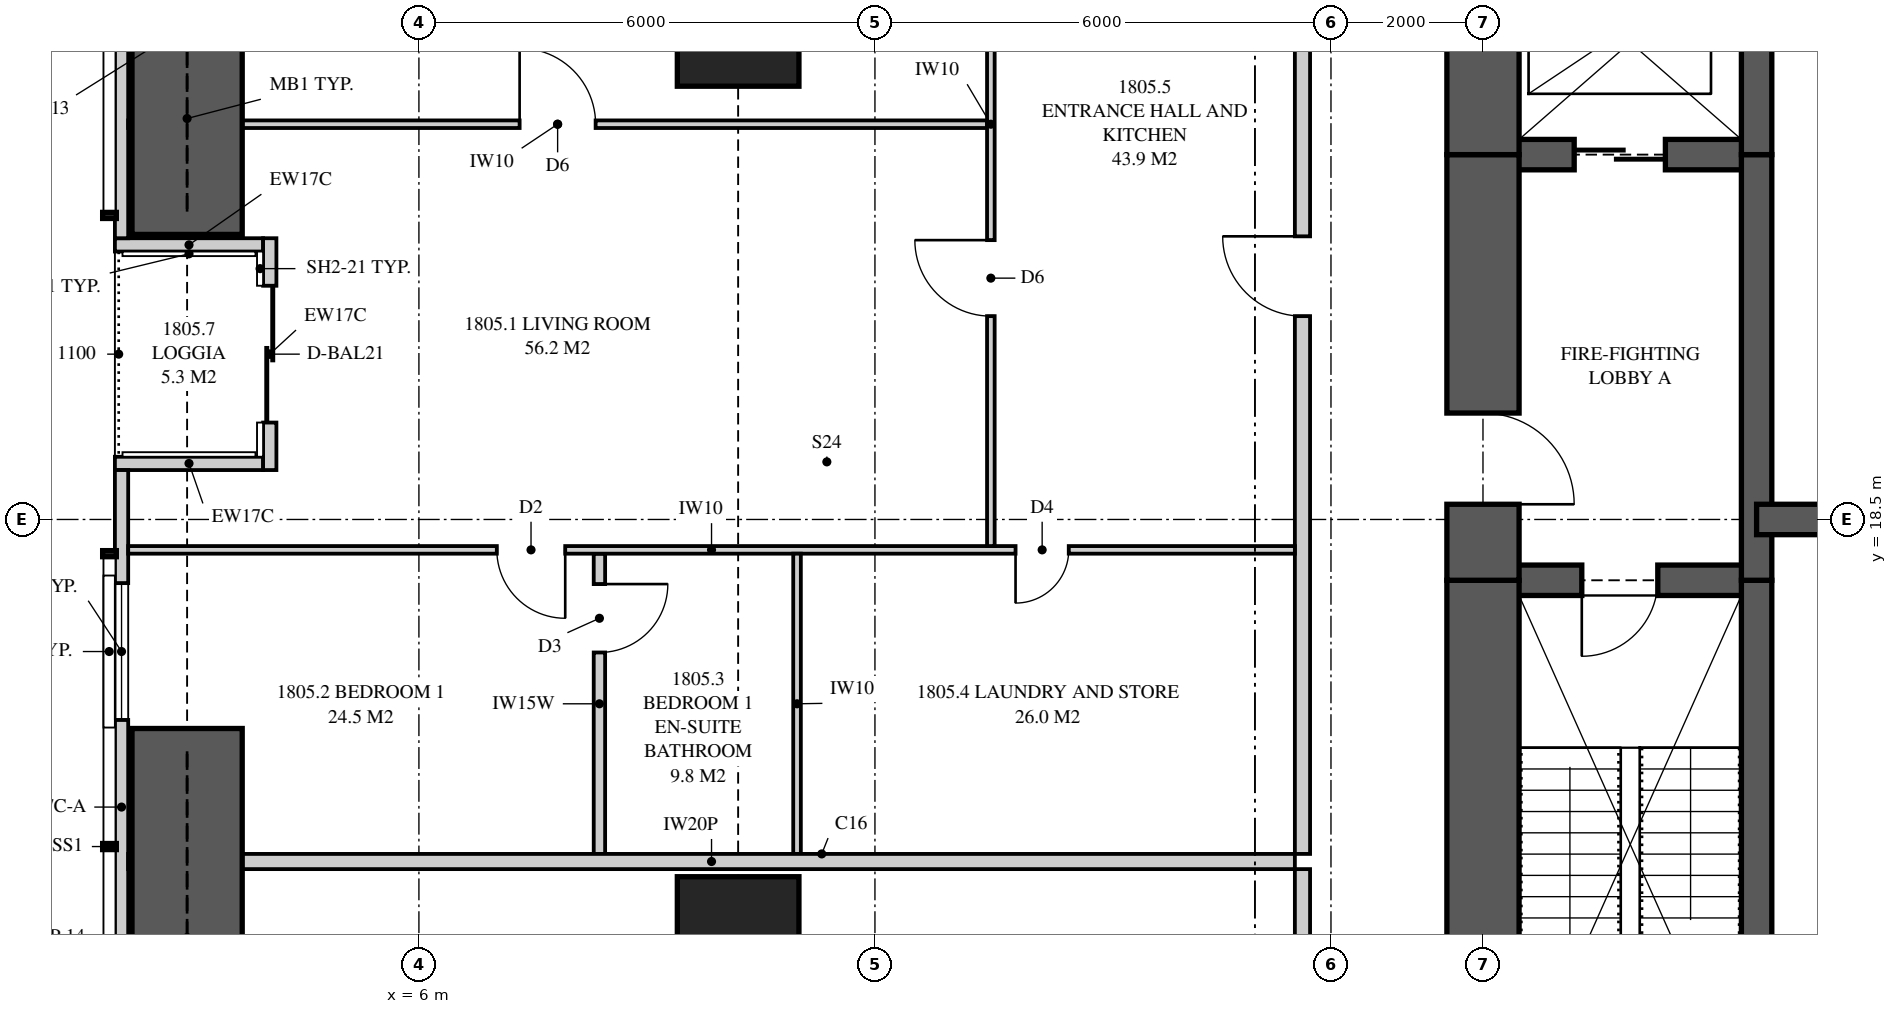
"""IFC4 building model, lengths in metres.
Left out: names, types, materials, properties, quantities, classifications, styles, units other than length and angle.
Written with IfcOpenShell. Run it as: python <this file> out.ifc"""

import sys

from ifc_helpers import new_model, si_unit, direction, frame, frame_2d, origin, origin_2d, place, context, subcontext, project, spatial, polyline, rectangle, outline, extrude, element, fill, save


model = new_model("IFC4")
c1 = context("Model", 3, precision=1e-05, world=origin(), true_north=direction((0.0, 1.0)))
c2 = subcontext(c1, "Body", "Model", "MODEL_VIEW")
j1 = project(units=[si_unit("LENGTHUNIT", "METRE"), si_unit("PLANEANGLEUNIT", "RADIAN")], contexts=[c1])
p1 = place(None, origin())
s1 = spatial("IfcSite", under=j1, at=p1, CompositionType="ELEMENT")
p2 = place(p1, origin())
s2 = spatial("IfcBuilding", under=s1, at=p2, CompositionType="ELEMENT")
p3 = place(p2, frame((0.0, 0.0, 67.9)))
s3 = spatial("IfcBuildingStorey", under=s2, at=p3, CompositionType="ELEMENT", Elevation=67.9)
for number, where, z_axis, x_axis in (
    (1, (10.2, 13.0, 0.0), (0.0, 0.0, 1.0), (1.0, 0.0, 0.0)),
    (2, (10.2, 25.0, 0.0), (0.0, 0.0, 1.0), (1.0, 0.0, 0.0)),
):
    element("IfcColumn", number, at=place(p3, frame(where, z_axis=z_axis, x_axis=x_axis)), inside=s3, PredefinedType="COLUMN", context=c2, shape_type="SweptSolid", body=[
        extrude(rectangle(XDim=1.6, YDim=1.6, at=origin_2d()), origin(), (0.0, 0.0, 1.0), 3.35),
    ])
p4 = place(p3, frame((20.0, 26.05, 0.0), z_axis=(0.0, 0.0, 1.0), x_axis=(0.0, -1.0, 0.0)))
e3 = element("IfcWall", 3, at=p4, inside=s3, PredefinedType="SHEAR", context=c2, shape_type="SweptSolid", body=[
    extrude(rectangle(XDim=2.75, YDim=0.95, at=frame_2d((1.375, 0.0))), origin(), (0.0, 0.0, 1.0), 3.35),
])
p5 = place(p3, frame((20.0, 23.3, 0.0), z_axis=(0.0, 0.0, 1.0), x_axis=(0.0, -1.0, 0.0)))
e4 = element("IfcWall", 4, at=p5, inside=s3, PredefinedType="SHEAR", context=c2, shape_type="SweptSolid", body=[
    extrude(rectangle(XDim=5.6, YDim=0.95, at=frame_2d((2.8, 0.0))), origin(), (0.0, 0.0, 1.0), 3.35),
])
p6 = place(p5, frame((3.4, 0.0, 0.0)))
e5 = element("IfcOpeningElement", 5, at=p6, cuts=e4, PredefinedType="OPENING", context=c2, shape_type="SweptSolid", body=[
    extrude(rectangle(XDim=1.2, YDim=2.2, at=frame_2d((0.6, 1.1))), frame((0.0, 0.485, 0.0), z_axis=(0.0, -1.0, 0.0), x_axis=(1.0, 0.0, 0.0)), (0.0, 0.0, 1.0), 0.97),
])
p7 = place(p3, frame((20.0, 17.7, 0.0), z_axis=(0.0, 0.0, 1.0), x_axis=(0.0, -1.0, 0.0)))
e6 = element("IfcWall", 6, at=p7, inside=s3, PredefinedType="SHEAR", context=c2, shape_type="SweptSolid", body=[
    extrude(rectangle(XDim=4.7, YDim=0.95, at=frame_2d((2.35, 0.0))), origin(), (0.0, 0.0, 1.0), 3.35),
])
p8 = place(p3, frame((23.6, 10.95, 0.0), z_axis=(0.0, 0.0, 1.0), x_axis=(0.0, 1.0, 0.0)))
e7 = element("IfcWall", 7, at=p8, inside=s3, PredefinedType="SHEAR", context=c2, shape_type="SweptSolid", body=[
    extrude(rectangle(XDim=6.75, YDim=0.4, at=frame_2d((3.375, 0.0))), origin(), (0.0, 0.0, 1.0), 3.35),
])
p9 = place(p3, frame((23.6, 17.7, 0.0), z_axis=(0.0, 0.0, 1.0), x_axis=(0.0, 1.0, 0.0)))
e8 = element("IfcWall", 8, at=p9, inside=s3, PredefinedType="SHEAR", context=c2, shape_type="SweptSolid", body=[
    extrude(rectangle(XDim=5.6, YDim=0.4, at=frame_2d((2.8, 0.0))), origin(), (0.0, 0.0, 1.0), 3.35),
])
p10 = place(p3, frame((23.6, 23.3, 0.0), z_axis=(0.0, 0.0, 1.0), x_axis=(0.0, 1.0, 0.0)))
e9 = element("IfcWall", 9, at=p10, inside=s3, PredefinedType="SHEAR", context=c2, shape_type="SweptSolid", body=[
    extrude(rectangle(XDim=2.75, YDim=0.4, at=frame_2d((1.375, 0.0))), origin(), (0.0, 0.0, 1.0), 3.35),
])
p11 = place(p3, frame((20.0, 17.7, 0.0), z_axis=(0.0, 0.0, 1.0), x_axis=(1.0, 0.0, 0.0)))
e10 = element("IfcWall", 10, at=p11, inside=s3, PredefinedType="SHEAR", context=c2, shape_type="SweptSolid", body=[
    extrude(rectangle(XDim=3.6, YDim=0.4, at=frame_2d((1.8, 0.0))), origin(), (0.0, 0.0, 1.0), 3.35),
])
p12 = place(p11, frame((1.3, 0.0, 0.0)))
e11 = element("IfcOpeningElement", 11, at=p12, cuts=e10, PredefinedType="OPENING", context=c2, shape_type="SweptSolid", body=[
    extrude(rectangle(XDim=1.0, YDim=2.1, at=frame_2d((0.5, 1.05))), frame((0.0, 0.21, 0.0), z_axis=(0.0, -1.0, 0.0), x_axis=(1.0, 0.0, 0.0)), (0.0, 0.0, 1.0), 0.42),
])
p13 = place(p3, frame((20.0, 23.3, 0.0), z_axis=(0.0, 0.0, 1.0), x_axis=(1.0, 0.0, 0.0)))
e12 = element("IfcWall", 12, at=p13, inside=s3, PredefinedType="SHEAR", context=c2, shape_type="SweptSolid", body=[
    extrude(rectangle(XDim=3.6, YDim=0.4, at=frame_2d((1.8, 0.0))), origin(), (0.0, 0.0, 1.0), 3.35),
])
p14 = place(p13, frame((1.2, 0.0, 0.0)))
e13 = element("IfcOpeningElement", 13, at=p14, cuts=e12, PredefinedType="OPENING", context=c2, shape_type="SweptSolid", body=[
    extrude(rectangle(XDim=1.2, YDim=2.1, at=frame_2d((0.6, 1.05))), frame((0.0, 0.21, 0.0), z_axis=(0.0, -1.0, 0.0), x_axis=(1.0, 0.0, 0.0)), (0.0, 0.0, 1.0), 0.42),
])
p15 = place(p3, frame((23.6, 18.5, 0.0), z_axis=(0.0, 0.0, 1.0), x_axis=(1.0, 0.0, 0.0)))
e14 = element("IfcWall", 14, at=p15, inside=s3, PredefinedType="SHEAR", context=c2, shape_type="SweptSolid", body=[
    extrude(rectangle(XDim=2.4, YDim=0.4, at=frame_2d((1.2, 0.0))), origin(), (0.0, 0.0, 1.0), 3.35),
])
p16 = place(p3, frame((2.087, 27.718, 0.0), z_axis=(0.0, 0.0, 1.0), x_axis=(0.0, -1.0, 0.0)))
e15 = element("IfcWall", 15, at=p16, inside=s3, PredefinedType="SOLIDWALL", context=c2, shape_type="SweptSolid", body=[
    extrude(rectangle(XDim=5.518, YDim=0.175, at=frame_2d((2.759, 0.0))), origin(), (0.0, 0.0, 1.0), 2.15),
])
p17 = place(p3, frame((2.087, 19.15, 0.0), z_axis=(0.0, 0.0, 1.0), x_axis=(0.0, -1.0, 0.0)))
e16 = element("IfcWall", 16, at=p17, inside=s3, PredefinedType="SOLIDWALL", context=c2, shape_type="SweptSolid", body=[
    extrude(rectangle(XDim=8.867, YDim=0.175, at=frame_2d((4.434, 0.0))), origin(), (0.0, 0.0, 1.0), 2.15),
])
p18 = place(p17, frame((1.488, 0.0, 0.4)))
e17 = element("IfcOpeningElement", 17, at=p18, cuts=e16, PredefinedType="OPENING", context=c2, shape_type="SweptSolid", body=[
    extrude(rectangle(XDim=1.8, YDim=1.7, at=frame_2d((0.9, 0.85))), frame((0.0, 0.097, 0.0), z_axis=(0.0, -1.0, 0.0), x_axis=(1.0, 0.0, 0.0)), (0.0, 0.0, 1.0), 0.195),
])
p19 = place(p3, frame((4.038, 22.2, 0.0), z_axis=(0.0, 0.0, 1.0), x_axis=(0.0, -1.0, 0.0)))
e18 = element("IfcWall", 18, at=p19, inside=s3, PredefinedType="SOLIDWALL", context=c2, shape_type="SweptSolid", body=[
    extrude(rectangle(XDim=3.05, YDim=0.175, at=frame_2d((1.525, 0.0))), origin(), (0.0, 0.0, 1.0), 2.15),
])
p20 = place(p19, frame((0.625, 0.0, 0.0)))
e19 = element("IfcOpeningElement", 19, at=p20, cuts=e18, PredefinedType="OPENING", context=c2, shape_type="SweptSolid", body=[
    extrude(rectangle(XDim=1.8, YDim=2.1, at=frame_2d((0.9, 1.05))), frame((0.0, 0.097, 0.0), z_axis=(0.0, -1.0, 0.0), x_axis=(1.0, 0.0, 0.0)), (0.0, 0.0, 1.0), 0.195),
])
for number, where, z_axis, x_axis in (
    (20, (2.0, 22.113, 0.0), (0.0, 0.0, 1.0), (1.0, 0.0, 0.0)),
    (21, (2.0, 19.238, 0.0), (0.0, 0.0, 1.0), (1.0, 0.0, 0.0)),
):
    element("IfcWall", number, at=place(p3, frame(where, z_axis=z_axis, x_axis=x_axis)), inside=s3, PredefinedType="SOLIDWALL", context=c2, shape_type="SweptSolid", body=[
        extrude(rectangle(XDim=1.95, YDim=0.175, at=frame_2d((0.975, 0.0))), origin(), (0.0, 0.0, 1.0), 2.15),
    ])
p21 = place(p3, frame((2.175, 14.0, 0.0), z_axis=(0.0, 0.0, 1.0), x_axis=(1.0, 0.0, 0.0)))
e22 = element("IfcWall", 22, at=p21, inside=s3, PredefinedType="PARTITIONING", context=c2, shape_type="SweptSolid", body=[
    extrude(outline(polyline([(0.529, 2.15), (0.0, 2.15), (0.0, 0.0), (0.529, 0.0), (0.529, 0.821), (1.021, 0.821), (1.021, 0.0), (15.35, 0.0), (15.35, 3.11), (9.335, 3.11), (9.335, 2.51), (6.715, 2.51), (6.715, 3.11), (2.085, 3.11), (2.085, 2.15), (1.021, 2.15), (1.021, 1.33), (0.529, 1.33), (0.529, 2.15)])), frame((0.0, 0.1, 0.0), z_axis=(0.0, -1.0, 0.0), x_axis=(1.0, 0.0, 0.0)), (0.0, 0.0, 1.0), 0.2),
])
p22 = place(p3, frame((17.625, 7.75, 0.0), z_axis=(0.0, 0.0, 1.0), x_axis=(0.0, 1.0, 0.0)))
e23 = element("IfcWall", 23, at=p22, inside=s3, PredefinedType="PARTITIONING", context=c2, shape_type="SweptSolid", body=[
    extrude(outline(polyline([(0.0, 0.0), (6.15, 0.0), (6.15, 3.11), (5.587, 3.11), (5.587, 2.541), (4.913, 2.541), (4.913, 3.11), (0.0, 3.11), (0.0, 0.0)])), frame((0.0, 0.1, 0.0), z_axis=(0.0, -1.0, 0.0), x_axis=(1.0, 0.0, 0.0)), (0.0, 0.0, 1.0), 0.2),
])
p23 = place(p22, frame((2.175, 0.0, 0.0)))
e24 = element("IfcOpeningElement", 24, at=p23, cuts=e23, PredefinedType="OPENING", context=c2, shape_type="SweptSolid", body=[
    extrude(rectangle(XDim=1.8, YDim=2.1, at=frame_2d((0.9, 1.05))), frame((0.0, 0.11, 0.0), z_axis=(0.0, -1.0, 0.0), x_axis=(1.0, 0.0, 0.0)), (0.0, 0.0, 1.0), 0.22),
])
p24 = place(p3, frame((17.625, 14.1, 0.0), z_axis=(0.0, 0.0, 1.0), x_axis=(0.0, 1.0, 0.0)))
e25 = element("IfcWall", 25, at=p24, inside=s3, PredefinedType="PARTITIONING", context=c2, shape_type="SweptSolid", body=[
    extrude(outline(polyline([(0.0, 0.0), (15.15, 0.0), (15.15, 3.11), (11.237, 3.11), (11.237, 2.541), (10.562, 2.541), (10.562, 3.11), (0.0, 3.11), (0.0, 0.0)])), frame((0.0, 0.1, 0.0), z_axis=(0.0, -1.0, 0.0), x_axis=(1.0, 0.0, 0.0)), (0.0, 0.0, 1.0), 0.2),
])
p25 = place(p24, frame((7.075, 0.0, 0.0)))
e26 = element("IfcOpeningElement", 26, at=p25, cuts=e25, PredefinedType="OPENING", context=c2, shape_type="SweptSolid", body=[
    extrude(rectangle(XDim=1.05, YDim=2.2, at=frame_2d((0.525, 1.1))), frame((0.0, 0.11, 0.0), z_axis=(0.0, -1.0, 0.0), x_axis=(1.0, 0.0, 0.0)), (0.0, 0.0, 1.0), 0.22),
])
p26 = place(p3, frame((2.175, 18.1, 0.0), z_axis=(0.0, 0.0, 1.0), x_axis=(1.0, 0.0, 0.0)))
e27 = element("IfcWall", 27, at=p26, inside=s3, PredefinedType="PARTITIONING", context=c2, shape_type="SweptSolid", body=[
    extrude(outline(polyline([(0.0, 0.0), (15.35, 0.0), (15.35, 3.11), (9.285, 3.11), (9.285, 2.51), (6.765, 2.51), (6.765, 3.11), (2.035, 3.11), (2.035, 2.15), (0.0, 2.15), (0.0, 3.11), (0.0, 0.0)])), frame((0.0, 0.05, 0.0), z_axis=(0.0, -1.0, 0.0), x_axis=(1.0, 0.0, 0.0)), (0.0, 0.0, 1.0), 0.1),
])
p27 = place(p26, frame((4.85, 0.0, 0.0)))
e28 = element("IfcOpeningElement", 28, at=p27, cuts=e27, PredefinedType="OPENING", context=c2, shape_type="SweptSolid", body=[
    extrude(rectangle(XDim=0.9, YDim=2.1, at=frame_2d((0.45, 1.05))), frame((0.0, 0.06, 0.0), z_axis=(0.0, -1.0, 0.0), x_axis=(1.0, 0.0, 0.0)), (0.0, 0.0, 1.0), 0.12),
])
p28 = place(p26, frame((11.675, 0.0, 0.0)))
e29 = element("IfcOpeningElement", 29, at=p28, cuts=e27, PredefinedType="OPENING", context=c2, shape_type="SweptSolid", body=[
    extrude(rectangle(XDim=0.7, YDim=2.1, at=frame_2d((0.35, 1.05))), frame((0.0, 0.06, 0.0), z_axis=(0.0, -1.0, 0.0), x_axis=(1.0, 0.0, 0.0)), (0.0, 0.0, 1.0), 0.12),
])
p29 = place(p3, frame((8.375, 14.1, 0.0), z_axis=(0.0, 0.0, 1.0), x_axis=(0.0, 1.0, 0.0)))
e30 = element("IfcWall", 30, at=p29, inside=s3, PredefinedType="PLUMBINGWALL", context=c2, shape_type="SweptSolid", body=[
    extrude(rectangle(XDim=3.95, YDim=0.15, at=frame_2d((1.975, 0.0))), origin(), (0.0, 0.0, 1.0), 3.11),
])
p30 = place(p29, frame((2.65, 0.0, 0.0)))
e31 = element("IfcOpeningElement", 31, at=p30, cuts=e30, PredefinedType="OPENING", context=c2, shape_type="SweptSolid", body=[
    extrude(rectangle(XDim=0.9, YDim=2.1, at=frame_2d((0.45, 1.05))), frame((0.0, 0.085, 0.0), z_axis=(0.0, -1.0, 0.0), x_axis=(1.0, 0.0, 0.0)), (0.0, 0.0, 1.0), 0.17),
])
p31 = place(p3, frame((10.975, 14.1, 0.0), z_axis=(0.0, 0.0, 1.0), x_axis=(0.0, 1.0, 0.0)))
e32 = element("IfcWall", 32, at=p31, inside=s3, PredefinedType="PARTITIONING", context=c2, shape_type="SweptSolid", body=[
    extrude(outline(polyline([(0.0, 0.0), (3.95, 0.0), (3.95, 3.11), (3.95, 2.51), (0.0, 2.51), (0.0, 3.11), (0.0, 0.0)])), frame((0.0, 0.05, 0.0), z_axis=(0.0, -1.0, 0.0), x_axis=(1.0, 0.0, 0.0)), (0.0, 0.0, 1.0), 0.1),
])
p32 = place(p3, frame((13.525, 18.15, 0.0), z_axis=(0.0, 0.0, 1.0), x_axis=(0.0, 1.0, 0.0)))
e33 = element("IfcWall", 33, at=p32, inside=s3, PredefinedType="PARTITIONING", context=c2, shape_type="SweptSolid", body=[
    extrude(outline(polyline([(0.0, 0.0), (11.1, 0.0), (11.1, 3.11), (7.137, 3.11), (7.137, 2.541), (6.563, 2.541), (6.563, 3.11), (0.0, 3.11), (0.0, 0.0)])), frame((0.0, 0.05, 0.0), z_axis=(0.0, -1.0, 0.0), x_axis=(1.0, 0.0, 0.0)), (0.0, 0.0, 1.0), 0.1),
])
p33 = place(p32, frame((3.025, 0.0, 0.0)))
e34 = element("IfcOpeningElement", 34, at=p33, cuts=e33, PredefinedType="OPENING", context=c2, shape_type="SweptSolid", body=[
    extrude(rectangle(XDim=1.0, YDim=2.1, at=frame_2d((0.5, 1.05))), frame((0.0, 0.06, 0.0), z_axis=(0.0, -1.0, 0.0), x_axis=(1.0, 0.0, 0.0)), (0.0, 0.0, 1.0), 0.12),
])
p34 = place(p3, frame((2.175, 23.7, 0.0), z_axis=(0.0, 0.0, 1.0), x_axis=(1.0, 0.0, 0.0)))
e35 = element("IfcWall", 35, at=p34, inside=s3, PredefinedType="PARTITIONING", context=c2, shape_type="SweptSolid", body=[
    extrude(outline(polyline([(0.529, 2.15), (0.0, 2.15), (0.0, 0.0), (0.529, 0.0), (0.529, 0.581), (1.021, 0.581), (1.021, 0.0), (11.3, 0.0), (11.3, 3.11), (9.285, 3.11), (9.285, 2.51), (6.765, 2.51), (6.765, 3.11), (2.035, 3.11), (2.035, 2.15), (1.021, 2.15), (1.021, 1.569), (0.529, 1.569), (0.529, 2.15)])), frame((0.0, 0.05, 0.0), z_axis=(0.0, -1.0, 0.0), x_axis=(1.0, 0.0, 0.0)), (0.0, 0.0, 1.0), 0.1),
])
p35 = place(p34, frame((5.15, 0.0, 0.0)))
e36 = element("IfcOpeningElement", 36, at=p35, cuts=e35, PredefinedType="OPENING", context=c2, shape_type="SweptSolid", body=[
    extrude(rectangle(XDim=1.0, YDim=2.1, at=frame_2d((0.5, 1.05))), frame((0.0, 0.06, 0.0), z_axis=(0.0, -1.0, 0.0), x_axis=(1.0, 0.0, 0.0)), (0.0, 0.0, 1.0), 0.12),
])
for number, where, z_axis, x_axis in (
    (37, (2.95, 22.25, 0.0), (0.0, 0.0, 1.0), (0.0, 1.0, 0.0)),
    (38, (2.95, 10.25, 0.0), (0.0, 0.0, 1.0), (0.0, 1.0, 0.0)),
):
    element("IfcWall", number, at=place(p3, frame(where, z_axis=z_axis, x_axis=x_axis)), inside=s3, PredefinedType="SHEAR", context=c2, shape_type="SweptSolid", body=[
        extrude(rectangle(XDim=5.5, YDim=1.45, at=frame_2d((2.75, 0.0))), origin(), (0.0, 0.0, 1.0), 3.35),
    ])
p36 = place(p20, origin())
e39 = element("IfcDoor", 39, at=p36, inside=s3, OperationType="SLIDING_TO_LEFT", PredefinedType="DOOR", context=c2, shape_type="SweptSolid", body=[
    extrude(rectangle(XDim=1.8, YDim=2.1, at=frame_2d((0.9, 1.05))), frame((0.0, 0.025, 0.0), z_axis=(0.0, -1.0, 0.0), x_axis=(1.0, 0.0, 0.0)), (0.0, 0.0, 1.0), 0.05),
])
fill(e19, e39)
p37 = place(p18, origin())
e40 = element("IfcWindow", 40, at=p37, inside=s3, PartitioningType="SINGLE_PANEL", PredefinedType="WINDOW", context=c2, shape_type="SweptSolid", body=[
    extrude(rectangle(XDim=1.8, YDim=1.7, at=frame_2d((0.9, 0.85))), frame((0.0, 0.03, 0.0), z_axis=(0.0, -1.0, 0.0), x_axis=(1.0, 0.0, 0.0)), (0.0, 0.0, 1.0), 0.06),
])
fill(e17, e40)
p38 = place(p25, origin())
e41 = element("IfcDoor", 41, at=p38, inside=s3, OperationType="SINGLE_SWING_RIGHT", PredefinedType="DOOR", context=c2, shape_type="SweptSolid", body=[
    extrude(rectangle(XDim=1.05, YDim=2.2, at=frame_2d((0.525, 1.1))), frame((0.0, 0.025, 0.0), z_axis=(0.0, -1.0, 0.0), x_axis=(1.0, 0.0, 0.0)), (0.0, 0.0, 1.0), 0.05),
])
fill(e26, e41)
p39 = place(p27, frame((0.9, 0.0, 0.0), z_axis=(0.0, 0.0, 1.0), x_axis=(-1.0, 0.0, 0.0)))
e42 = element("IfcDoor", 42, at=p39, inside=s3, OperationType="SINGLE_SWING_LEFT", PredefinedType="DOOR", context=c2, shape_type="SweptSolid", body=[
    extrude(rectangle(XDim=0.9, YDim=2.1, at=frame_2d((0.45, 1.05))), frame((0.0, 0.025, 0.0), z_axis=(0.0, -1.0, 0.0), x_axis=(1.0, 0.0, 0.0)), (0.0, 0.0, 1.0), 0.05),
])
fill(e28, e42)
p40 = place(p30, frame((0.9, 0.0, 0.0), z_axis=(0.0, 0.0, 1.0), x_axis=(-1.0, 0.0, 0.0)))
e43 = element("IfcDoor", 43, at=p40, inside=s3, OperationType="SINGLE_SWING_LEFT", PredefinedType="DOOR", context=c2, shape_type="SweptSolid", body=[
    extrude(rectangle(XDim=0.9, YDim=2.1, at=frame_2d((0.45, 1.05))), frame((0.0, 0.025, 0.0), z_axis=(0.0, -1.0, 0.0), x_axis=(1.0, 0.0, 0.0)), (0.0, 0.0, 1.0), 0.05),
])
fill(e31, e43)
p41 = place(p28, frame((0.7, 0.0, 0.0), z_axis=(0.0, 0.0, 1.0), x_axis=(-1.0, 0.0, 0.0)))
e44 = element("IfcDoor", 44, at=p41, inside=s3, OperationType="SINGLE_SWING_RIGHT", PredefinedType="DOOR", context=c2, shape_type="SweptSolid", body=[
    extrude(rectangle(XDim=0.7, YDim=2.1, at=frame_2d((0.35, 1.05))), frame((0.0, 0.025, 0.0), z_axis=(0.0, -1.0, 0.0), x_axis=(1.0, 0.0, 0.0)), (0.0, 0.0, 1.0), 0.05),
])
fill(e29, e44)
p42 = place(p33, origin())
e45 = element("IfcDoor", 45, at=p42, inside=s3, OperationType="SINGLE_SWING_RIGHT", PredefinedType="DOOR", context=c2, shape_type="SweptSolid", body=[
    extrude(rectangle(XDim=1.0, YDim=2.1, at=frame_2d((0.5, 1.05))), frame((0.0, 0.025, 0.0), z_axis=(0.0, -1.0, 0.0), x_axis=(1.0, 0.0, 0.0)), (0.0, 0.0, 1.0), 0.05),
])
fill(e34, e45)
p43 = place(p35, origin())
e46 = element("IfcDoor", 46, at=p43, inside=s3, OperationType="SINGLE_SWING_LEFT", PredefinedType="DOOR", context=c2, shape_type="SweptSolid", body=[
    extrude(rectangle(XDim=1.0, YDim=2.1, at=frame_2d((0.5, 1.05))), frame((0.0, 0.025, 0.0), z_axis=(0.0, -1.0, 0.0), x_axis=(1.0, 0.0, 0.0)), (0.0, 0.0, 1.0), 0.05),
])
fill(e36, e46)
p44 = place(p12, frame((1.0, 0.0, 0.0), z_axis=(0.0, 0.0, 1.0), x_axis=(-1.0, 0.0, 0.0)))
e47 = element("IfcDoor", 47, at=p44, inside=s3, OperationType="SINGLE_SWING_RIGHT", PredefinedType="DOOR", context=c2, shape_type="SweptSolid", body=[
    extrude(rectangle(XDim=1.0, YDim=2.1, at=frame_2d((0.5, 1.05))), frame((0.0, 0.025, 0.0), z_axis=(0.0, -1.0, 0.0), x_axis=(1.0, 0.0, 0.0)), (0.0, 0.0, 1.0), 0.05),
])
fill(e11, e47)
p45 = place(p6, origin())
e48 = element("IfcDoor", 48, at=p45, inside=s3, OperationType="SINGLE_SWING_RIGHT", PredefinedType="DOOR", context=c2, shape_type="SweptSolid", body=[
    extrude(rectangle(XDim=1.2, YDim=2.2, at=frame_2d((0.6, 1.1))), frame((0.0, 0.025, 0.0), z_axis=(0.0, -1.0, 0.0), x_axis=(1.0, 0.0, 0.0)), (0.0, 0.0, 1.0), 0.05),
])
fill(e5, e48)
p46 = place(p14, origin())
e49 = element("IfcDoor", 49, at=p46, inside=s3, OperationType="SLIDING_TO_LEFT", PredefinedType="DOOR", context=c2, shape_type="SweptSolid", body=[
    extrude(rectangle(XDim=1.2, YDim=2.1, at=frame_2d((0.6, 1.05))), frame((0.0, 0.025, 0.0), z_axis=(0.0, -1.0, 0.0), x_axis=(1.0, 0.0, 0.0)), (0.0, 0.0, 1.0), 0.05),
])
fill(e13, e49)
save(model, sys.argv[1])
